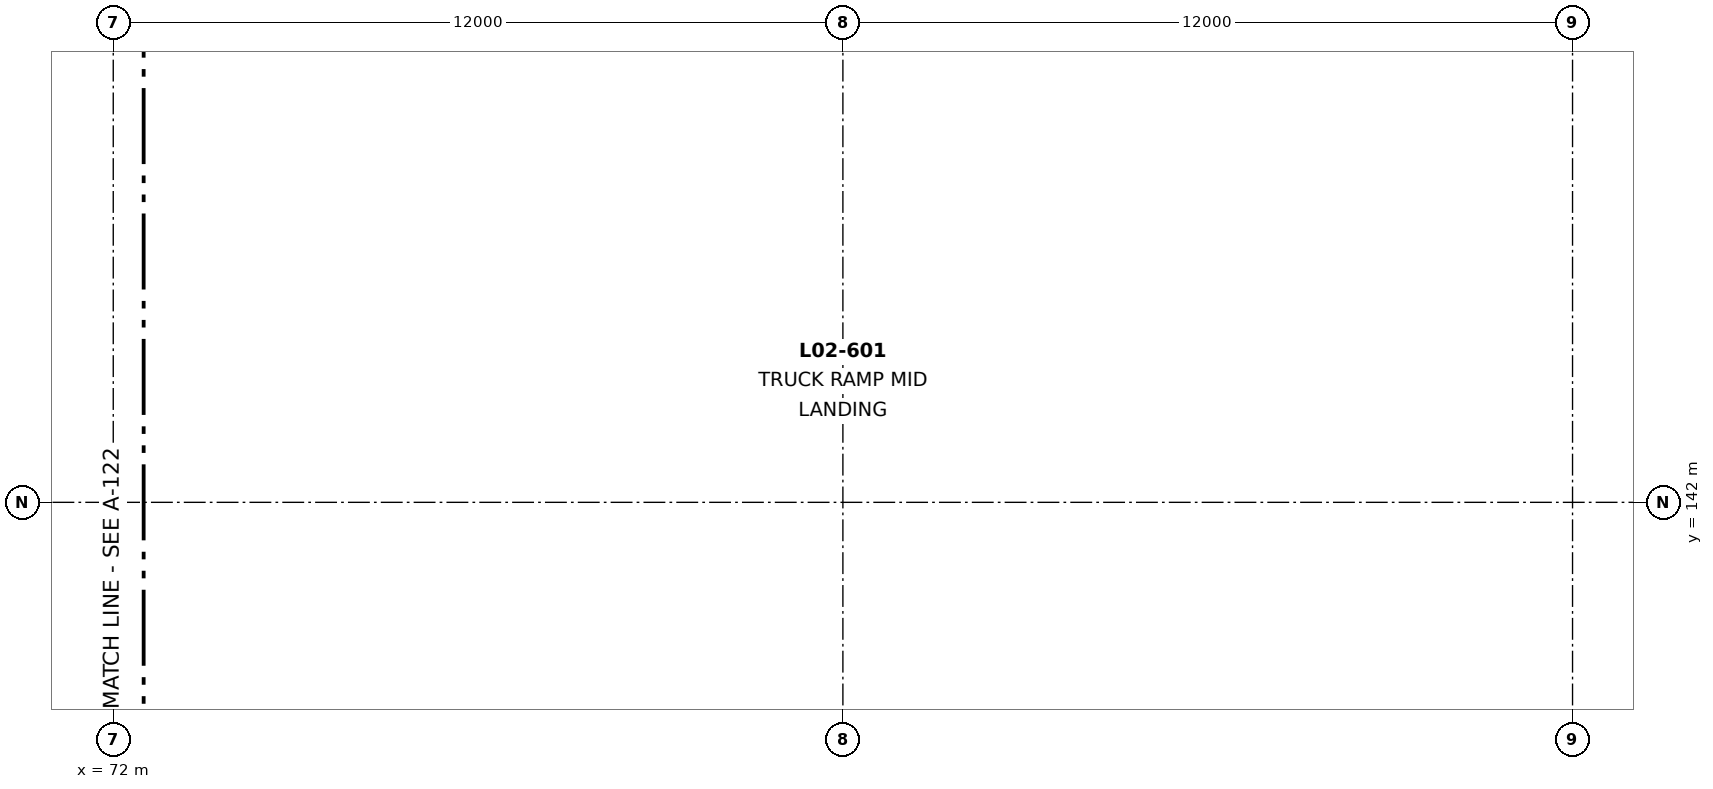
"""IFC4 building model, lengths in metres.
Left out: names, types, materials, properties, quantities, classifications, styles, units other than length and angle.
Written with IfcOpenShell. Run it as: python <this file> out.ifc"""

import sys

from ifc_helpers import new_model, si_unit, direction, frame, frame_2d, origin, place, context, subcontext, project, spatial, rectangle, extrude, element, save


model = new_model("IFC4")
c1 = context("Model", 3, precision=1e-05, world=origin(), true_north=direction((0.0, 1.0)))
c2 = subcontext(c1, "Body", "Model", "MODEL_VIEW")
j1 = project(units=[si_unit("LENGTHUNIT", "METRE"), si_unit("PLANEANGLEUNIT", "RADIAN")], contexts=[c1])
p1 = place(None, origin())
s1 = spatial("IfcSite", under=j1, at=p1, CompositionType="ELEMENT")
p2 = place(p1, origin())
s2 = spatial("IfcBuilding", under=s1, at=p2, CompositionType="ELEMENT")
p3 = place(p2, origin())
s3 = spatial("IfcBuildingStorey", under=s2, at=p3, CompositionType="ELEMENT", Elevation=0.0)
for number, where, z_axis, x_axis in (
    (1, (12.0, 139.47, 0.0), (0.0, 0.0, 1.0), (1.0, 0.0, 0.0)),
    (2, (12.0, 148.53, 0.0), (0.0, 0.0, 1.0), (1.0, 0.0, 0.0)),
):
    element("IfcWall", number, at=place(p3, frame(where, z_axis=z_axis, x_axis=x_axis)), inside=s3, PredefinedType="SHEAR", context=c2, shape_type="SweptSolid", body=[
        extrude(rectangle(XDim=60.0, YDim=0.26, at=frame_2d((30.0, 0.0))), origin(), (0.0, 0.0, 1.0), 5.6),
    ])
for number, where, z_axis, x_axis in (
    (3, (72.0, 139.47, 0.0), (0.0, 0.0, 1.0), (1.0, 0.0, 0.0)),
    (4, (72.0, 148.53, 0.0), (0.0, 0.0, 1.0), (1.0, 0.0, 0.0)),
):
    element("IfcWall", number, at=place(p3, frame(where, z_axis=z_axis, x_axis=x_axis)), inside=s3, PredefinedType="SHEAR", context=c2, shape_type="SweptSolid", body=[
        extrude(rectangle(XDim=24.0, YDim=0.26, at=frame_2d((12.0, 0.0))), origin(), (0.0, 0.0, 1.0), 5.6),
    ])
for number, where, z_axis, x_axis in (
    (5, (96.0, 139.47, 0.0), (0.0, 0.0, 1.0), (1.0, 0.0, 0.0)),
    (6, (96.0, 148.53, 0.0), (0.0, 0.0, 1.0), (1.0, 0.0, 0.0)),
):
    element("IfcWall", number, at=place(p3, frame(where, z_axis=z_axis, x_axis=x_axis)), inside=s3, PredefinedType="SHEAR", context=c2, shape_type="SweptSolid", body=[
        extrude(rectangle(XDim=29.95, YDim=0.26, at=frame_2d((14.975, 0.0))), origin(), (0.0, 0.0, 1.0), 9.8),
    ])
save(model, sys.argv[1])
